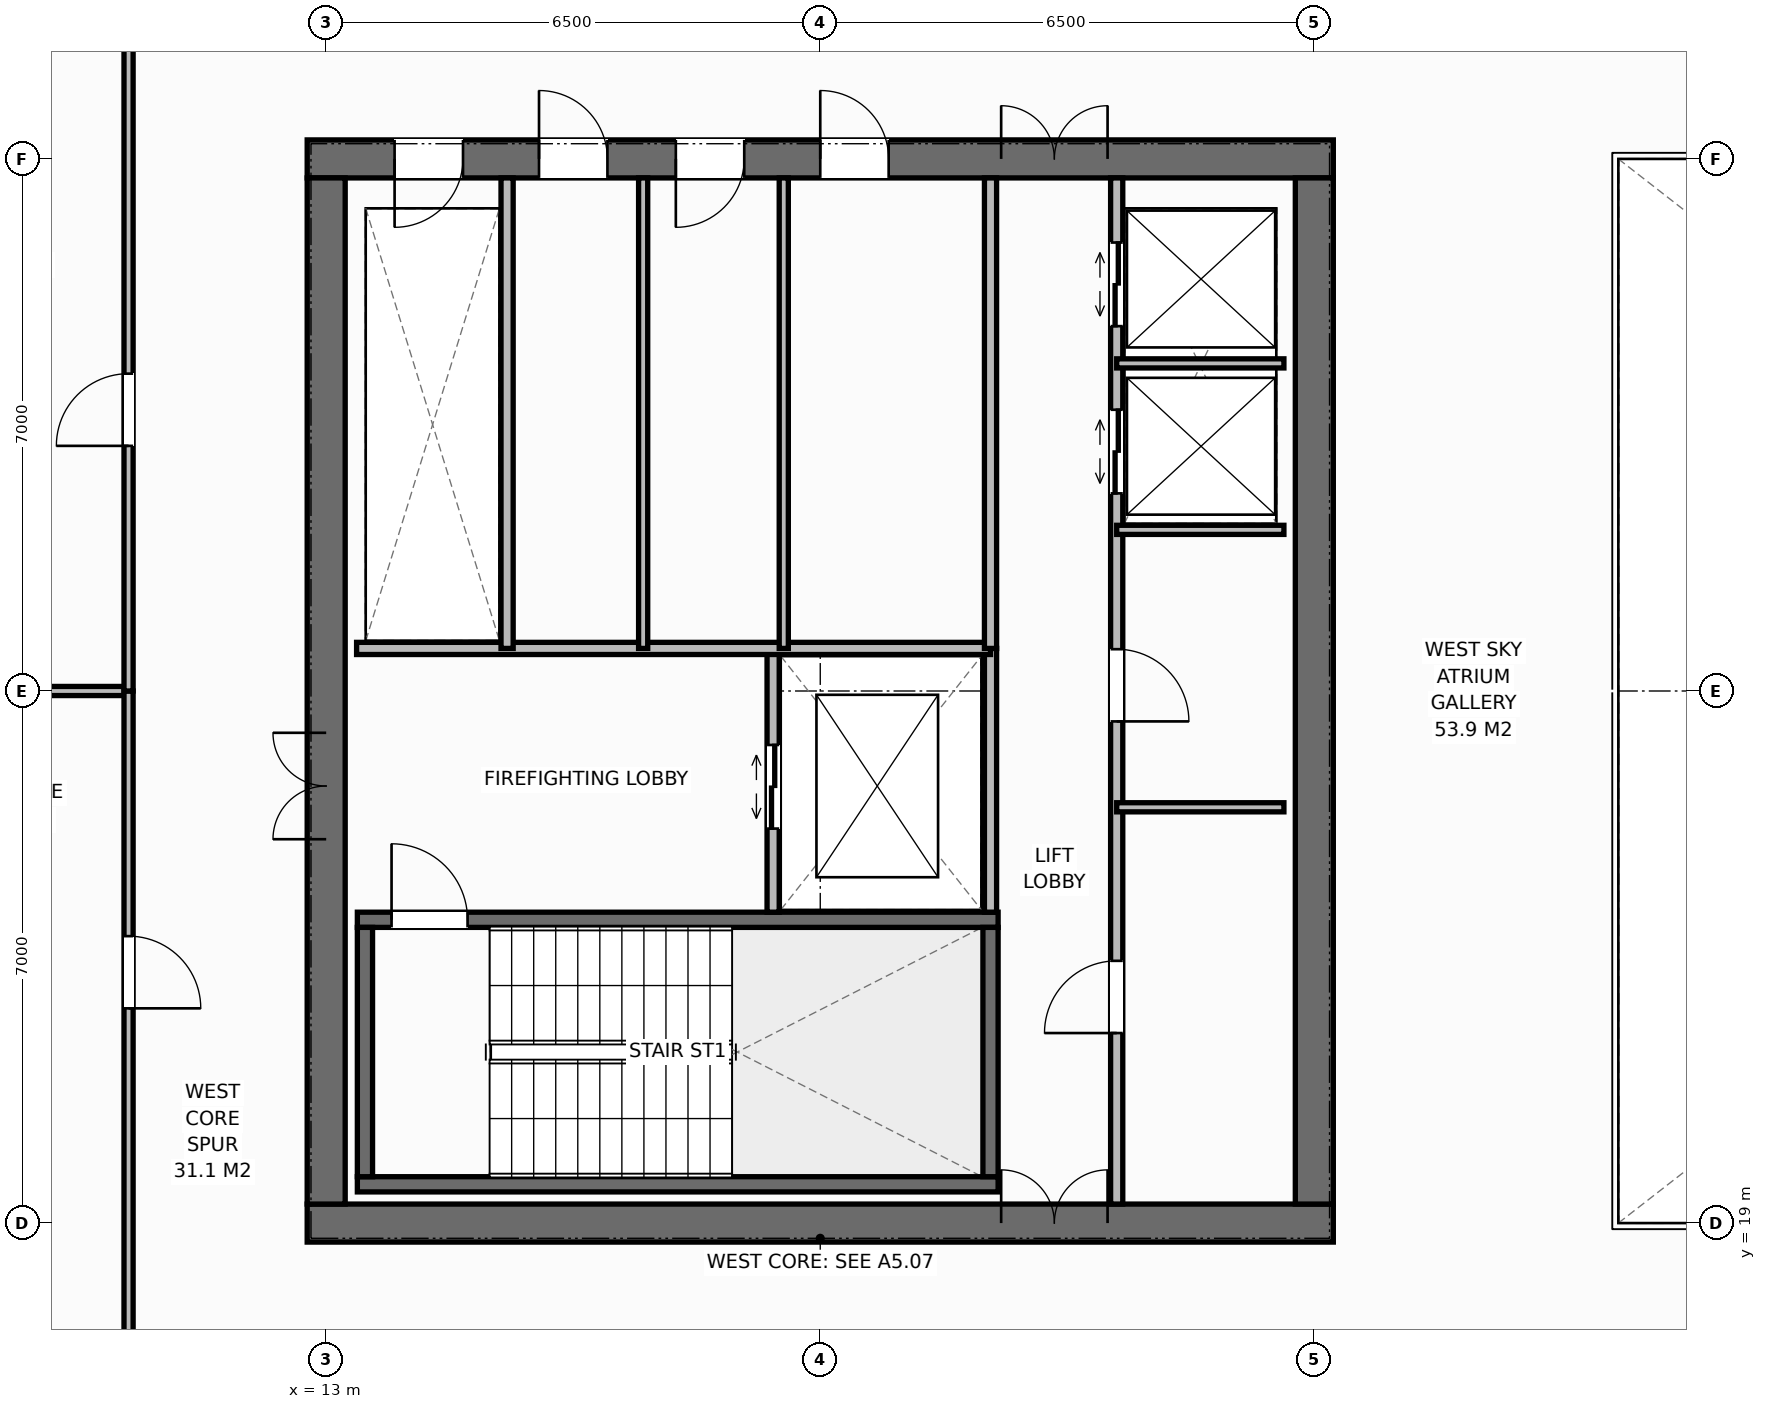
"""IFC4 building model, lengths in metres.
Left out: names, types, materials, properties, quantities, classifications, styles, units other than length and angle.
Written with IfcOpenShell. Run it as: python <this file> out.ifc"""

import sys

from ifc_helpers import new_model, si_unit, direction, frame, frame_2d, origin, place, context, subcontext, project, spatial, rectangle, extrude, element, fill, save


model = new_model("IFC4")
c1 = context("Model", 3, precision=1e-05, world=origin(), true_north=direction((0.0, 1.0)))
c2 = subcontext(c1, "Body", "Model", "MODEL_VIEW")
j1 = project(units=[si_unit("LENGTHUNIT", "METRE"), si_unit("PLANEANGLEUNIT", "RADIAN")], contexts=[c1])
p1 = place(None, origin())
s1 = spatial("IfcSite", under=j1, at=p1, CompositionType="ELEMENT")
p2 = place(p1, origin())
s2 = spatial("IfcBuilding", under=s1, at=p2, CompositionType="ELEMENT")
p3 = place(p2, frame((0.0, 0.0, 286.4)))
s3 = spatial("IfcBuildingStorey", under=s2, at=p3, CompositionType="ELEMENT", Elevation=286.4)
p4 = place(p3, frame((12.75, 19.0, 0.0), z_axis=(0.0, 0.0, 1.0), x_axis=(1.0, 0.0, 0.0)))
e1 = element("IfcWall", 1, at=p4, inside=s3, PredefinedType="SHEAR", context=c2, shape_type="SweptSolid", body=[
    extrude(rectangle(XDim=13.5, YDim=0.5, at=frame_2d((6.75, 0.0))), origin(), (0.0, 0.0, 1.0), 4.0),
])
p5 = place(p4, frame((9.13, 0.0, 0.0)))
e2 = element("IfcOpeningElement", 2, at=p5, cuts=e1, PredefinedType="OPENING", context=c2, shape_type="SweptSolid", body=[
    extrude(rectangle(XDim=1.4, YDim=2.2, at=frame_2d((0.7, 1.1))), frame((0.0, 0.26, 0.0), z_axis=(0.0, -1.0, 0.0), x_axis=(1.0, 0.0, 0.0)), (0.0, 0.0, 1.0), 0.52),
])
p6 = place(p3, frame((12.75, 33.0, 0.0), z_axis=(0.0, 0.0, 1.0), x_axis=(1.0, 0.0, 0.0)))
e3 = element("IfcWall", 3, at=p6, inside=s3, PredefinedType="SHEAR", context=c2, shape_type="SweptSolid", body=[
    extrude(rectangle(XDim=13.5, YDim=0.5, at=frame_2d((6.75, 0.0))), origin(), (0.0, 0.0, 1.0), 4.0),
])
p7 = place(p6, frame((1.15, 0.0, 0.0)))
e4 = element("IfcOpeningElement", 4, at=p7, cuts=e3, PredefinedType="OPENING", context=c2, shape_type="SweptSolid", body=[
    extrude(rectangle(XDim=0.9, YDim=2.15, at=frame_2d((0.45, 1.075))), frame((0.0, 0.26, 0.0), z_axis=(0.0, -1.0, 0.0), x_axis=(1.0, 0.0, 0.0)), (0.0, 0.0, 1.0), 0.52),
])
p8 = place(p6, frame((3.05, 0.0, 0.0)))
e5 = element("IfcOpeningElement", 5, at=p8, cuts=e3, PredefinedType="OPENING", context=c2, shape_type="SweptSolid", body=[
    extrude(rectangle(XDim=0.9, YDim=2.15, at=frame_2d((0.45, 1.075))), frame((0.0, 0.26, 0.0), z_axis=(0.0, -1.0, 0.0), x_axis=(1.0, 0.0, 0.0)), (0.0, 0.0, 1.0), 0.52),
])
p9 = place(p6, frame((4.85, 0.0, 0.0)))
e6 = element("IfcOpeningElement", 6, at=p9, cuts=e3, PredefinedType="OPENING", context=c2, shape_type="SweptSolid", body=[
    extrude(rectangle(XDim=0.9, YDim=2.15, at=frame_2d((0.45, 1.075))), frame((0.0, 0.26, 0.0), z_axis=(0.0, -1.0, 0.0), x_axis=(1.0, 0.0, 0.0)), (0.0, 0.0, 1.0), 0.52),
])
p10 = place(p6, frame((6.75, 0.0, 0.0)))
e7 = element("IfcOpeningElement", 7, at=p10, cuts=e3, PredefinedType="OPENING", context=c2, shape_type="SweptSolid", body=[
    extrude(rectangle(XDim=0.9, YDim=2.15, at=frame_2d((0.45, 1.075))), frame((0.0, 0.26, 0.0), z_axis=(0.0, -1.0, 0.0), x_axis=(1.0, 0.0, 0.0)), (0.0, 0.0, 1.0), 0.52),
])
p11 = place(p6, frame((9.13, 0.0, 0.0)))
e8 = element("IfcOpeningElement", 8, at=p11, cuts=e3, PredefinedType="OPENING", context=c2, shape_type="SweptSolid", body=[
    extrude(rectangle(XDim=1.4, YDim=2.2, at=frame_2d((0.7, 1.1))), frame((0.0, 0.26, 0.0), z_axis=(0.0, -1.0, 0.0), x_axis=(1.0, 0.0, 0.0)), (0.0, 0.0, 1.0), 0.52),
])
p12 = place(p3, frame((13.0, 19.25, 0.0), z_axis=(0.0, 0.0, 1.0), x_axis=(0.0, 1.0, 0.0)))
e9 = element("IfcWall", 9, at=p12, inside=s3, PredefinedType="SHEAR", context=c2, shape_type="SweptSolid", body=[
    extrude(rectangle(XDim=13.5, YDim=0.5, at=frame_2d((6.75, 0.0))), origin(), (0.0, 0.0, 1.0), 4.0),
])
p13 = place(p12, frame((4.8, 0.0, 0.0)))
e10 = element("IfcOpeningElement", 10, at=p13, cuts=e9, PredefinedType="OPENING", context=c2, shape_type="SweptSolid", body=[
    extrude(rectangle(XDim=1.4, YDim=2.2, at=frame_2d((0.7, 1.1))), frame((0.0, 0.26, 0.0), z_axis=(0.0, -1.0, 0.0), x_axis=(1.0, 0.0, 0.0)), (0.0, 0.0, 1.0), 0.52),
])
p14 = place(p3, frame((26.0, 19.25, 0.0), z_axis=(0.0, 0.0, 1.0), x_axis=(0.0, 1.0, 0.0)))
e11 = element("IfcWall", 11, at=p14, inside=s3, PredefinedType="SHEAR", context=c2, shape_type="SweptSolid", body=[
    extrude(rectangle(XDim=13.5, YDim=0.5, at=frame_2d((6.75, 0.0))), origin(), (0.0, 0.0, 1.0), 4.0),
])
p15 = place(p3, frame((13.41, 19.51, 0.0), z_axis=(0.0, 0.0, 1.0), x_axis=(1.0, 0.0, 0.0)))
e12 = element("IfcWall", 12, at=p15, inside=s3, PredefinedType="SHEAR", context=c2, shape_type="SweptSolid", body=[
    extrude(rectangle(XDim=8.43, YDim=0.2, at=frame_2d((4.215, 0.0))), origin(), (0.0, 0.0, 1.0), 4.0),
])
p16 = place(p3, frame((13.41, 22.99, 0.0), z_axis=(0.0, 0.0, 1.0), x_axis=(1.0, 0.0, 0.0)))
e13 = element("IfcWall", 13, at=p16, inside=s3, PredefinedType="SHEAR", context=c2, shape_type="SweptSolid", body=[
    extrude(rectangle(XDim=8.43, YDim=0.2, at=frame_2d((4.215, 0.0))), origin(), (0.0, 0.0, 1.0), 4.0),
])
p17 = place(p16, frame((0.45, 0.0, 0.0)))
e14 = element("IfcOpeningElement", 14, at=p17, cuts=e13, PredefinedType="OPENING", context=c2, shape_type="SweptSolid", body=[
    extrude(rectangle(XDim=1.0, YDim=2.15, at=frame_2d((0.5, 1.075))), frame((0.0, 0.11, 0.0), z_axis=(0.0, -1.0, 0.0), x_axis=(1.0, 0.0, 0.0)), (0.0, 0.0, 1.0), 0.22),
])
for number, where, z_axis, x_axis in (
    (15, (13.51, 19.61, 0.0), (0.0, 0.0, 1.0), (0.0, 1.0, 0.0)),
    (16, (21.74, 19.61, 0.0), (0.0, 0.0, 1.0), (0.0, 1.0, 0.0)),
):
    element("IfcWall", number, at=place(p3, frame(where, z_axis=z_axis, x_axis=x_axis)), inside=s3, PredefinedType="SHEAR", context=c2, shape_type="SweptSolid", body=[
        extrude(rectangle(XDim=3.28, YDim=0.2, at=frame_2d((1.64, 0.0))), origin(), (0.0, 0.0, 1.0), 4.0),
    ])
p18 = place(p3, frame((21.74, 23.09, 0.0), z_axis=(0.0, 0.0, 1.0), x_axis=(0.0, 1.0, 0.0)))
e17 = element("IfcWall", 17, at=p18, inside=s3, PredefinedType="STANDARD", context=c2, shape_type="SweptSolid", body=[
    extrude(rectangle(XDim=3.47, YDim=0.16, at=frame_2d((1.735, 0.0))), origin(), (0.0, 0.0, 1.0), 3.788),
])
p19 = place(p3, frame((18.88, 23.09, 0.0), z_axis=(0.0, 0.0, 1.0), x_axis=(0.0, 1.0, 0.0)))
e18 = element("IfcWall", 18, at=p19, inside=s3, PredefinedType="STANDARD", context=c2, shape_type="SweptSolid", body=[
    extrude(rectangle(XDim=3.47, YDim=0.16, at=frame_2d((1.735, 0.0))), origin(), (0.0, 0.0, 1.0), 3.788),
])
p20 = place(p19, frame((1.1, 0.0, 0.0)))
e19 = element("IfcOpeningElement", 19, at=p20, cuts=e18, PredefinedType="OPENING", context=c2, shape_type="SweptSolid", body=[
    extrude(rectangle(XDim=1.1, YDim=2.2, at=frame_2d((0.55, 1.1))), frame((0.0, 0.09, 0.0), z_axis=(0.0, -1.0, 0.0), x_axis=(1.0, 0.0, 0.0)), (0.0, 0.0, 1.0), 0.18),
])
p21 = place(p3, frame((13.4, 26.56, 0.0), z_axis=(0.0, 0.0, 1.0), x_axis=(1.0, 0.0, 0.0)))
e20 = element("IfcWall", 20, at=p21, inside=s3, PredefinedType="STANDARD", context=c2, shape_type="SweptSolid", body=[
    extrude(rectangle(XDim=8.34, YDim=0.16, at=frame_2d((4.17, 0.0))), origin(), (0.0, 0.0, 1.0), 3.788),
])
p22 = place(p3, frame((15.38, 26.56, 0.0), z_axis=(0.0, 0.0, 1.0), x_axis=(0.0, 1.0, 0.0)))
e21 = element("IfcWall", 21, at=p22, inside=s3, PredefinedType="STANDARD", context=c2, shape_type="SweptSolid", body=[
    extrude(rectangle(XDim=6.19, YDim=0.16, at=frame_2d((3.095, 0.0))), origin(), (0.0, 0.0, 1.0), 3.788),
])
for number, where, z_axis, x_axis in (
    (22, (17.17, 26.56, 0.0), (0.0, 0.0, 1.0), (0.0, 1.0, 0.0)),
    (23, (19.02, 26.56, 0.0), (0.0, 0.0, 1.0), (0.0, 1.0, 0.0)),
):
    element("IfcWall", number, at=place(p3, frame(where, z_axis=z_axis, x_axis=x_axis)), inside=s3, PredefinedType="PARTITIONING", context=c2, shape_type="SweptSolid", body=[
        extrude(rectangle(XDim=6.19, YDim=0.12, at=frame_2d((3.095, 0.0))), origin(), (0.0, 0.0, 1.0), 3.788),
    ])
p23 = place(p3, frame((21.74, 26.56, 0.0), z_axis=(0.0, 0.0, 1.0), x_axis=(0.0, 1.0, 0.0)))
e24 = element("IfcWall", 24, at=p23, inside=s3, PredefinedType="STANDARD", context=c2, shape_type="SweptSolid", body=[
    extrude(rectangle(XDim=6.19, YDim=0.16, at=frame_2d((3.095, 0.0))), origin(), (0.0, 0.0, 1.0), 3.788),
])
p24 = place(p3, frame((23.4, 19.25, 0.0), z_axis=(0.0, 0.0, 1.0), x_axis=(0.0, 1.0, 0.0)))
e25 = element("IfcWall", 25, at=p24, inside=s3, PredefinedType="STANDARD", context=c2, shape_type="SweptSolid", body=[
    extrude(rectangle(XDim=13.5, YDim=0.16, at=frame_2d((6.75, 0.0))), origin(), (0.0, 0.0, 1.0), 3.788),
])
p25 = place(p24, frame((2.25, 0.0, 0.0)))
e26 = element("IfcOpeningElement", 26, at=p25, cuts=e25, PredefinedType="OPENING", context=c2, shape_type="SweptSolid", body=[
    extrude(rectangle(XDim=0.95, YDim=2.15, at=frame_2d((0.475, 1.075))), frame((0.0, 0.09, 0.0), z_axis=(0.0, -1.0, 0.0), x_axis=(1.0, 0.0, 0.0)), (0.0, 0.0, 1.0), 0.18),
])
p26 = place(p24, frame((6.35, 0.0, 0.0)))
e27 = element("IfcOpeningElement", 27, at=p26, cuts=e25, PredefinedType="OPENING", context=c2, shape_type="SweptSolid", body=[
    extrude(rectangle(XDim=0.95, YDim=2.15, at=frame_2d((0.475, 1.075))), frame((0.0, 0.09, 0.0), z_axis=(0.0, -1.0, 0.0), x_axis=(1.0, 0.0, 0.0)), (0.0, 0.0, 1.0), 0.18),
])
p27 = place(p24, frame((9.35, 0.0, 0.0)))
e28 = element("IfcOpeningElement", 28, at=p27, cuts=e25, PredefinedType="OPENING", context=c2, shape_type="SweptSolid", body=[
    extrude(rectangle(XDim=1.1, YDim=2.2, at=frame_2d((0.55, 1.1))), frame((0.0, 0.09, 0.0), z_axis=(0.0, -1.0, 0.0), x_axis=(1.0, 0.0, 0.0)), (0.0, 0.0, 1.0), 0.18),
])
p28 = place(p24, frame((11.55, 0.0, 0.0)))
e29 = element("IfcOpeningElement", 29, at=p28, cuts=e25, PredefinedType="OPENING", context=c2, shape_type="SweptSolid", body=[
    extrude(rectangle(XDim=1.1, YDim=2.2, at=frame_2d((0.55, 1.1))), frame((0.0, 0.09, 0.0), z_axis=(0.0, -1.0, 0.0), x_axis=(1.0, 0.0, 0.0)), (0.0, 0.0, 1.0), 0.18),
])
for number, where, z_axis, x_axis in (
    (30, (23.4, 24.47, 0.0), (0.0, 0.0, 1.0), (1.0, 0.0, 0.0)),
    (31, (23.4, 28.12, 0.0), (0.0, 0.0, 1.0), (1.0, 0.0, 0.0)),
    (32, (23.4, 30.31, 0.0), (0.0, 0.0, 1.0), (1.0, 0.0, 0.0)),
):
    element("IfcWall", number, at=place(p3, frame(where, z_axis=z_axis, x_axis=x_axis)), inside=s3, PredefinedType="PARTITIONING", context=c2, shape_type="SweptSolid", body=[
        extrude(rectangle(XDim=2.2, YDim=0.12, at=frame_2d((1.1, 0.0))), origin(), (0.0, 0.0, 1.0), 3.788),
    ])
p29 = place(p3, frame((7.22, 26.0, 0.0), z_axis=(0.0, 0.0, 1.0), x_axis=(1.0, 0.0, 0.0)))
e33 = element("IfcWall", 33, at=p29, inside=s3, PredefinedType="PARTITIONING", context=c2, shape_type="SweptSolid", body=[
    extrude(rectangle(XDim=3.18, YDim=0.12, at=frame_2d((1.59, 0.0))), origin(), (0.0, 0.0, 1.0), 3.788),
])
p30 = place(p3, frame((10.4, 16.5, 0.0), z_axis=(0.0, 0.0, 1.0), x_axis=(0.0, 1.0, 0.0)))
e34 = element("IfcWall", 34, at=p30, inside=s3, PredefinedType="PARTITIONING", context=c2, shape_type="SweptSolid", body=[
    extrude(rectangle(XDim=9.5, YDim=0.12, at=frame_2d((4.75, 0.0))), origin(), (0.0, 0.0, 1.0), 3.788),
])
p31 = place(p30, frame((5.325, 0.0, 0.0)))
e35 = element("IfcOpeningElement", 35, at=p31, cuts=e34, PredefinedType="OPENING", context=c2, shape_type="SweptSolid", body=[
    extrude(rectangle(XDim=0.95, YDim=2.15, at=frame_2d((0.475, 1.075))), frame((0.0, 0.07, 0.0), z_axis=(0.0, -1.0, 0.0), x_axis=(1.0, 0.0, 0.0)), (0.0, 0.0, 1.0), 0.14),
])
p32 = place(p3, frame((10.4, 26.0, 0.0), z_axis=(0.0, 0.0, 1.0), x_axis=(0.0, 1.0, 0.0)))
e36 = element("IfcWall", 36, at=p32, inside=s3, PredefinedType="PARTITIONING", context=c2, shape_type="SweptSolid", body=[
    extrude(rectangle(XDim=9.5, YDim=0.12, at=frame_2d((4.75, 0.0))), origin(), (0.0, 0.0, 1.0), 3.788),
])
p33 = place(p32, frame((3.225, 0.0, 0.0)))
e37 = element("IfcOpeningElement", 37, at=p33, cuts=e36, PredefinedType="OPENING", context=c2, shape_type="SweptSolid", body=[
    extrude(rectangle(XDim=0.95, YDim=2.15, at=frame_2d((0.475, 1.075))), frame((0.0, 0.07, 0.0), z_axis=(0.0, -1.0, 0.0), x_axis=(1.0, 0.0, 0.0)), (0.0, 0.0, 1.0), 0.14),
])
p34 = place(p17, origin())
e38 = element("IfcDoor", 38, at=p34, inside=s3, OperationType="SINGLE_SWING_LEFT", PredefinedType="DOOR", context=c2, shape_type="SweptSolid", body=[
    extrude(rectangle(XDim=1.0, YDim=2.15, at=frame_2d((0.5, 1.075))), frame((0.0, 0.025, 0.0), z_axis=(0.0, -1.0, 0.0), x_axis=(1.0, 0.0, 0.0)), (0.0, 0.0, 1.0), 0.05),
])
fill(e14, e38)
p35 = place(p13, origin())
e39 = element("IfcDoor", 39, at=p35, inside=s3, OperationType="DOUBLE_DOOR_SINGLE_SWING", PredefinedType="DOOR", context=c2, shape_type="SweptSolid", body=[
    extrude(rectangle(XDim=1.4, YDim=2.2, at=frame_2d((0.7, 1.1))), frame((0.0, 0.025, 0.0), z_axis=(0.0, -1.0, 0.0), x_axis=(1.0, 0.0, 0.0)), (0.0, 0.0, 1.0), 0.05),
])
fill(e10, e39)
p36 = place(p20, origin())
e40 = element("IfcDoor", 40, at=p36, inside=s3, OperationType="DOUBLE_DOOR_SLIDING", PredefinedType="DOOR", context=c2, shape_type="SweptSolid", body=[
    extrude(rectangle(XDim=1.1, YDim=2.2, at=frame_2d((0.55, 1.1))), frame((0.0, 0.025, 0.0), z_axis=(0.0, -1.0, 0.0), x_axis=(1.0, 0.0, 0.0)), (0.0, 0.0, 1.0), 0.05),
])
fill(e19, e40)
p37 = place(p7, origin())
e41 = element("IfcDoor", 41, at=p37, inside=s3, OperationType="SINGLE_SWING_RIGHT", PredefinedType="DOOR", context=c2, shape_type="SweptSolid", body=[
    extrude(rectangle(XDim=0.9, YDim=2.15, at=frame_2d((0.45, 1.075))), frame((0.0, -0.025, 0.0), z_axis=(0.0, -1.0, 0.0), x_axis=(1.0, 0.0, 0.0)), (0.0, 0.0, 1.0), 0.05),
])
fill(e4, e41)
p38 = place(p8, origin())
e42 = element("IfcDoor", 42, at=p38, inside=s3, OperationType="SINGLE_SWING_LEFT", PredefinedType="DOOR", context=c2, shape_type="SweptSolid", body=[
    extrude(rectangle(XDim=0.9, YDim=2.15, at=frame_2d((0.45, 1.075))), frame((0.0, -0.025, 0.0), z_axis=(0.0, -1.0, 0.0), x_axis=(1.0, 0.0, 0.0)), (0.0, 0.0, 1.0), 0.05),
])
fill(e5, e42)
p39 = place(p9, origin())
e43 = element("IfcDoor", 43, at=p39, inside=s3, OperationType="SINGLE_SWING_RIGHT", PredefinedType="DOOR", context=c2, shape_type="SweptSolid", body=[
    extrude(rectangle(XDim=0.9, YDim=2.15, at=frame_2d((0.45, 1.075))), frame((0.0, -0.025, 0.0), z_axis=(0.0, -1.0, 0.0), x_axis=(1.0, 0.0, 0.0)), (0.0, 0.0, 1.0), 0.05),
])
fill(e6, e43)
p40 = place(p10, origin())
e44 = element("IfcDoor", 44, at=p40, inside=s3, OperationType="SINGLE_SWING_LEFT", PredefinedType="DOOR", context=c2, shape_type="SweptSolid", body=[
    extrude(rectangle(XDim=0.9, YDim=2.15, at=frame_2d((0.45, 1.075))), frame((0.0, -0.025, 0.0), z_axis=(0.0, -1.0, 0.0), x_axis=(1.0, 0.0, 0.0)), (0.0, 0.0, 1.0), 0.05),
])
fill(e7, e44)
p41 = place(p5, origin())
e45 = element("IfcDoor", 45, at=p41, inside=s3, OperationType="DOUBLE_DOOR_SINGLE_SWING", PredefinedType="DOOR", context=c2, shape_type="SweptSolid", body=[
    extrude(rectangle(XDim=1.4, YDim=2.2, at=frame_2d((0.7, 1.1))), frame((0.0, 0.075, 0.0), z_axis=(0.0, -1.0, 0.0), x_axis=(1.0, 0.0, 0.0)), (0.0, 0.0, 1.0), 0.05),
])
fill(e2, e45)
p42 = place(p11, origin())
e46 = element("IfcDoor", 46, at=p42, inside=s3, OperationType="DOUBLE_DOOR_SINGLE_SWING", PredefinedType="DOOR", context=c2, shape_type="SweptSolid", body=[
    extrude(rectangle(XDim=1.4, YDim=2.2, at=frame_2d((0.7, 1.1))), frame((0.0, -0.025, 0.0), z_axis=(0.0, -1.0, 0.0), x_axis=(1.0, 0.0, 0.0)), (0.0, 0.0, 1.0), 0.05),
])
fill(e8, e46)
p43 = place(p25, origin())
e47 = element("IfcDoor", 47, at=p43, inside=s3, OperationType="SINGLE_SWING_LEFT", PredefinedType="DOOR", context=c2, shape_type="SweptSolid", body=[
    extrude(rectangle(XDim=0.95, YDim=2.15, at=frame_2d((0.475, 1.075))), frame((0.0, 0.025, 0.0), z_axis=(0.0, -1.0, 0.0), x_axis=(1.0, 0.0, 0.0)), (0.0, 0.0, 1.0), 0.05),
])
fill(e26, e47)
p44 = place(p26, origin())
e48 = element("IfcDoor", 48, at=p44, inside=s3, OperationType="SINGLE_SWING_RIGHT", PredefinedType="DOOR", context=c2, shape_type="SweptSolid", body=[
    extrude(rectangle(XDim=0.95, YDim=2.15, at=frame_2d((0.475, 1.075))), frame((0.0, 0.025, 0.0), z_axis=(0.0, -1.0, 0.0), x_axis=(1.0, 0.0, 0.0)), (0.0, 0.0, 1.0), 0.05),
])
fill(e27, e48)
p45 = place(p27, origin())
e49 = element("IfcDoor", 49, at=p45, inside=s3, OperationType="DOUBLE_DOOR_SLIDING", PredefinedType="DOOR", context=c2, shape_type="SweptSolid", body=[
    extrude(rectangle(XDim=1.1, YDim=2.2, at=frame_2d((0.55, 1.1))), frame((0.0, 0.025, 0.0), z_axis=(0.0, -1.0, 0.0), x_axis=(1.0, 0.0, 0.0)), (0.0, 0.0, 1.0), 0.05),
])
fill(e28, e49)
p46 = place(p28, origin())
e50 = element("IfcDoor", 50, at=p46, inside=s3, OperationType="DOUBLE_DOOR_SLIDING", PredefinedType="DOOR", context=c2, shape_type="SweptSolid", body=[
    extrude(rectangle(XDim=1.1, YDim=2.2, at=frame_2d((0.55, 1.1))), frame((0.0, 0.025, 0.0), z_axis=(0.0, -1.0, 0.0), x_axis=(1.0, 0.0, 0.0)), (0.0, 0.0, 1.0), 0.05),
])
fill(e29, e50)
p47 = place(p31, origin())
e51 = element("IfcDoor", 51, at=p47, inside=s3, OperationType="SINGLE_SWING_RIGHT", PredefinedType="DOOR", context=c2, shape_type="SweptSolid", body=[
    extrude(rectangle(XDim=0.95, YDim=2.15, at=frame_2d((0.475, 1.075))), frame((0.0, 0.025, 0.0), z_axis=(0.0, -1.0, 0.0), x_axis=(1.0, 0.0, 0.0)), (0.0, 0.0, 1.0), 0.05),
])
fill(e35, e51)
p48 = place(p33, origin())
e52 = element("IfcDoor", 52, at=p48, inside=s3, OperationType="SINGLE_SWING_LEFT", PredefinedType="DOOR", context=c2, shape_type="SweptSolid", body=[
    extrude(rectangle(XDim=0.95, YDim=2.15, at=frame_2d((0.475, 1.075))), frame((0.0, 0.025, 0.0), z_axis=(0.0, -1.0, 0.0), x_axis=(1.0, 0.0, 0.0)), (0.0, 0.0, 1.0), 0.05),
])
fill(e37, e52)
save(model, sys.argv[1])
